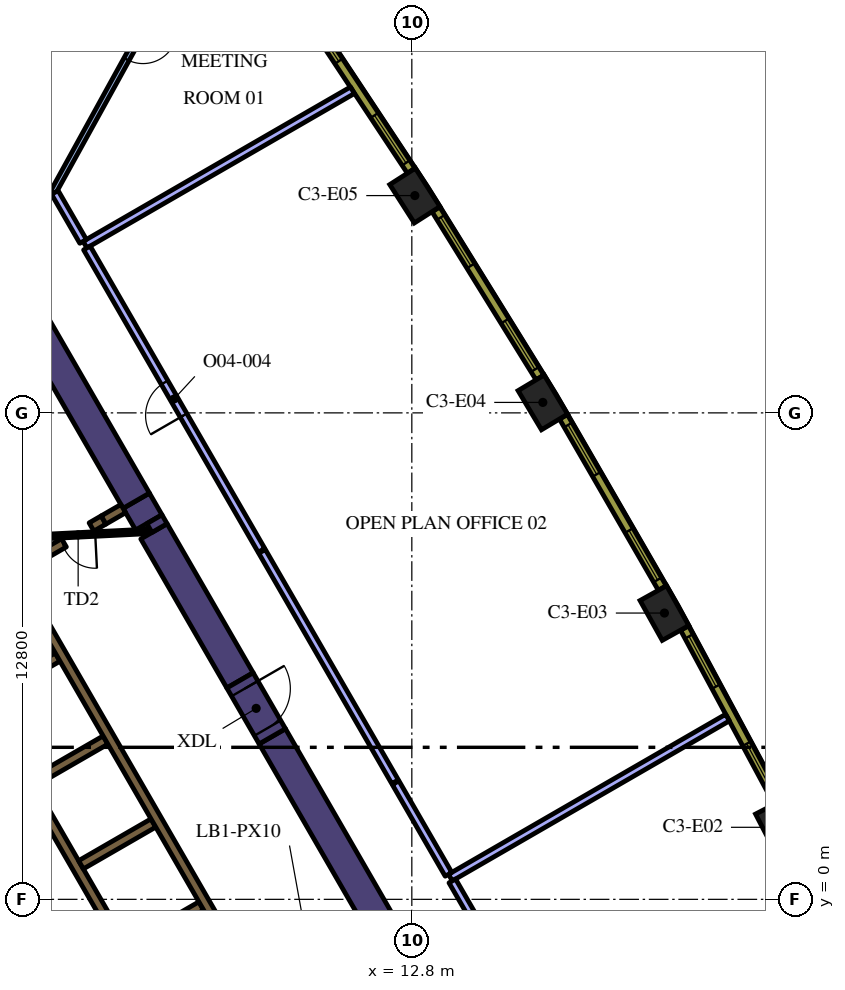
"""IFC4 building model, lengths in metres.
Left out: names, types, materials, properties, quantities, classifications, styles, units other than length and angle.
Written with IfcOpenShell. Run it as: python <this file> out.ifc"""

import sys

from ifc_helpers import new_model, si_unit, direction, frame, frame_2d, origin, origin_2d, place, context, subcontext, project, spatial, polyline, rectangle, outline, extrude, element, fill, save


model = new_model("IFC4")
c1 = context("Model", 3, precision=1e-05, world=origin(), true_north=direction((0.0, 1.0)))
c2 = subcontext(c1, "Body", "Model", "MODEL_VIEW")
j1 = project(units=[si_unit("LENGTHUNIT", "METRE"), si_unit("PLANEANGLEUNIT", "RADIAN")], contexts=[c1])
p1 = place(None, origin())
s1 = spatial("IfcSite", under=j1, at=p1, CompositionType="ELEMENT")
p2 = place(p1, origin())
s2 = spatial("IfcBuilding", under=s1, at=p2, CompositionType="ELEMENT")
p3 = place(p2, frame((0.0, 0.0, 187.8)))
s3 = spatial("IfcBuildingStorey", under=s2, at=p3, CompositionType="ELEMENT", Elevation=187.8)
for number, where, z_axis, x_axis in (
    (1, (22.476, 1.896, 0.0), (0.0, 0.0, 1.0), (-0.46, 0.888, 0.0)),
    (2, (19.447, 7.533, 0.0), (0.0, 0.0, 1.0), (-0.487, 0.874, 0.0)),
    (3, (16.247, 13.075, 0.0), (0.0, 0.0, 1.0), (-0.513, 0.858, 0.0)),
    (4, (12.88, 18.517, 0.0), (0.0, 0.0, 1.0), (-0.539, 0.842, 0.0)),
):
    element("IfcColumn", number, at=place(p3, frame(where, z_axis=z_axis, x_axis=x_axis)), inside=s3, PredefinedType="COLUMN", context=c2, shape_type="SweptSolid", body=[
        extrude(rectangle(XDim=1.2, YDim=0.8, at=origin_2d()), origin(), (0.0, 0.0, 1.0), 4.2),
    ])
p4 = place(p3, frame((9.129, 4.289, 0.0), z_axis=(0.0, 0.0, 1.0), x_axis=(0.499995742806, -0.866027861663, 0.0)))
e5 = element("IfcWall", 5, at=p4, inside=s3, PredefinedType="SOLIDWALL", context=c2, shape_type="SweptSolid", body=[
    extrude(rectangle(XDim=12.527, YDim=0.8, at=frame_2d((6.264, 0.0))), origin(), (0.0, 0.0, 1.0), 4.2),
])
p5 = place(p3, frame((5.878, 9.918, 0.0), z_axis=(0.0, 0.0, 1.0), x_axis=(-0.499893918903, 0.866086641072, 0.0)))
e6 = element("IfcWall", 6, at=p5, inside=s3, PredefinedType="SOLIDWALL", context=c2, shape_type="SweptSolid", body=[
    extrude(rectangle(XDim=0.657, YDim=0.8, at=frame_2d((0.329, 0.0))), origin(), (0.0, 0.0, 1.0), 4.2),
])
p6 = place(p3, frame((8.279, 5.761, 0.0), z_axis=(0.0, 0.0, 1.0), x_axis=(-0.500024261398, 0.866011396007, 0.0)))
e7 = element("IfcWall", 7, at=p6, inside=s3, PredefinedType="SOLIDWALL", context=c2, shape_type="SweptSolid", body=[
    extrude(rectangle(XDim=4.528, YDim=0.8, at=frame_2d((2.264, 0.0))), origin(), (0.0, 0.0, 1.0), 4.2),
])
p7 = place(p3, origin())
e8 = element("IfcWall", 8, at=p7, inside=s3, PredefinedType="SOLIDWALL", context=c2, shape_type="SweptSolid", body=[
    extrude(outline(polyline([(5.961, 9.654), (5.827, 9.886), (6.226, 10.116), (6.36, 9.884), (5.961, 9.654)])), origin(), (0.0, 0.0, 1.0), 4.2),
])
p8 = place(p3, frame((5.549, 10.489, 0.0), z_axis=(0.0, 0.0, 1.0), x_axis=(-0.50001746176, 0.866015321998, 0.0)))
e9 = element("IfcWall", 9, at=p8, inside=s3, PredefinedType="SOLIDWALL", context=c2, shape_type="SweptSolid", body=[
    extrude(rectangle(XDim=7.068, YDim=0.8, at=frame_2d((3.534, 0.0))), origin(), (0.0, 0.0, 1.0), 4.2),
])
p9 = place(p3, frame((6.568, -3.627, 0.0), z_axis=(0.0, 0.0, 1.0), x_axis=(-0.499999455981, 0.866025717874, 0.0)))
e10 = element("IfcWall", 10, at=p9, inside=s3, PredefinedType="SOLIDWALL", context=c2, shape_type="SweptSolid", body=[
    extrude(rectangle(XDim=11.978, YDim=0.25, at=frame_2d((5.989, 0.0))), origin(), (0.0, 0.0, 1.0), 4.2),
])
p10 = place(p3, frame((3.647, 9.38, 0.0), z_axis=(0.0, 0.0, 1.0), x_axis=(-0.866025015791, -0.500000672024, 0.0)))
e11 = element("IfcWall", 11, at=p10, inside=s3, PredefinedType="SOLIDWALL", context=c2, shape_type="SweptSolid", body=[
    extrude(rectangle(XDim=3.849, YDim=0.25, at=frame_2d((1.924, 0.0))), origin(), (0.0, 0.0, 1.0), 4.2),
])
p11 = place(p3, frame((1.574, 5.274, 0.0), z_axis=(0.0, 0.0, 1.0), x_axis=(0.866028486751, 0.499994660107, 0.0)))
e12 = element("IfcWall", 12, at=p11, inside=s3, PredefinedType="SOLIDWALL", context=c2, shape_type="SweptSolid", body=[
    extrude(rectangle(XDim=2.2, YDim=0.25, at=frame_2d((1.1, 0.0))), origin(), (0.0, 0.0, 1.0), 4.2),
])
for number, where, z_axis, x_axis in (
    (13, (2.834, 3.091, 0.0), (0.0, 0.0, 1.0), (0.866, 0.5, 0.0)),
    (14, (4.094, 0.909, 0.0), (0.0, 0.0, 1.0), (0.866, 0.5, 0.0)),
    (15, (5.354, -1.274, 0.0), (0.0, 0.0, 1.0), (0.866, 0.5, 0.0)),
):
    element("IfcWall", number, at=place(p3, frame(where, z_axis=z_axis, x_axis=x_axis)), inside=s3, PredefinedType="SOLIDWALL", context=c2, shape_type="SweptSolid", body=[
        extrude(rectangle(XDim=2.2, YDim=0.25, at=frame_2d((1.1, 0.0))), origin(), (0.0, 0.0, 1.0), 4.2),
    ])
p12 = place(p3, frame((4.688, 9.981, 0.0), z_axis=(0.0, 0.0, 1.0), x_axis=(-0.865974312977, -0.500088481434, 0.0)))
e16 = element("IfcWall", 16, at=p12, inside=s3, PredefinedType="SOLIDWALL", context=c2, shape_type="SweptSolid", body=[
    extrude(rectangle(XDim=0.366, YDim=0.25, at=frame_2d((0.183, 0.0))), origin(), (0.0, 0.0, 1.0), 4.2),
])
p13 = place(p3, frame((4.689, 9.982, 0.0), z_axis=(0.0, 0.0, 1.0), x_axis=(0.865947592822, 0.500134748329, 0.0)))
e17 = element("IfcWall", 17, at=p13, inside=s3, PredefinedType="SOLIDWALL", context=c2, shape_type="SweptSolid", body=[
    extrude(rectangle(XDim=0.598, YDim=0.25, at=frame_2d((0.299, 0.0))), origin(), (0.0, 0.0, 1.0), 4.2),
])
p14 = place(p3, frame((8.565, -2.185, 0.0), z_axis=(0.0, 0.0, 1.0), x_axis=(-0.499997954832, 0.866026584559, 0.0)))
e18 = element("IfcWall", 18, at=p14, inside=s3, PredefinedType="SOLIDWALL", context=c2, shape_type="SweptSolid", body=[
    extrude(rectangle(XDim=12.35, YDim=0.25, at=frame_2d((6.175, 0.0))), origin(), (0.0, 0.0, 1.0), 4.2),
])
p15 = place(p14, frame((0.585, 0.0, 0.0)))
e19 = element("IfcOpeningElement", 19, at=p15, cuts=e18, PredefinedType="OPENING", context=c2, shape_type="SweptSolid", body=[
    extrude(rectangle(XDim=1.1, YDim=2.1, at=frame_2d((0.55, 1.05))), frame((0.0, 0.135, 0.0), z_axis=(0.0, -1.0, 0.0), x_axis=(1.0, 0.0, 0.0)), (0.0, 0.0, 1.0), 0.27),
])
p16 = place(p3, frame((5.917, 9.684, 0.0), z_axis=(0.0, 0.0, 1.0), x_axis=(-0.998758194515, -0.049820366212, 0.0)))
e20 = element("IfcWall", 20, at=p16, inside=s3, PredefinedType="PARTITIONING", context=c2, shape_type="SweptSolid", body=[
    extrude(rectangle(XDim=2.7, YDim=0.12, at=frame_2d((1.35, 0.0))), origin(), (0.0, 0.0, 1.0), 3.15),
])
p17 = place(p16, frame((1.45, 0.0, 0.0)))
e21 = element("IfcOpeningElement", 21, at=p17, cuts=e20, PredefinedType="OPENING", context=c2, shape_type="SweptSolid", body=[
    extrude(rectangle(XDim=0.9, YDim=2.1, at=frame_2d((0.45, 1.05))), frame((0.0, 0.07, 0.0), z_axis=(0.0, -1.0, 0.0), x_axis=(1.0, 0.0, 0.0)), (0.0, 0.0, 1.0), 0.14),
])
p18 = place(p3, frame((8.279, 5.761, 0.0), z_axis=(0.0, 0.0, 1.0), x_axis=(0.500062241894, -0.865989465428, 0.0)))
e22 = element("IfcWall", 22, at=p18, inside=s3, PredefinedType="SOLIDWALL", context=c2, shape_type="SweptSolid", body=[
    extrude(rectangle(XDim=1.7, YDim=0.8, at=frame_2d((0.85, 0.0))), origin(), (0.0, 0.0, 1.0), 4.2),
])
p19 = place(p18, frame((0.25, 0.0, 0.0)))
e23 = element("IfcOpeningElement", 23, at=p19, cuts=e22, PredefinedType="OPENING", context=c2, shape_type="SweptSolid", body=[
    extrude(rectangle(XDim=1.2, YDim=2.1, at=frame_2d((0.6, 1.05))), frame((0.0, 0.41, 0.0), z_axis=(0.0, -1.0, 0.0), x_axis=(1.0, 0.0, 0.0)), (0.0, 0.0, 1.0), 0.82),
])
p20 = place(p3, frame((13.815, 0.572, 0.0), z_axis=(0.0, 0.0, 1.0), x_axis=(0.866036391575, 0.499980968105, 0.0)))
e24 = element("IfcWall", 24, at=p20, inside=s3, PredefinedType="PARTITIONING", context=c2, shape_type="SweptSolid", body=[
    extrude(rectangle(XDim=8.42, YDim=0.2, at=frame_2d((4.21, 0.0))), origin(), (0.0, 0.0, 1.0), 3.15),
])
p21 = place(p3, frame((17.796, -6.324, 0.0), z_axis=(0.0, 0.0, 1.0), x_axis=(-0.500026166427, 0.866010296064, 0.0)))
e25 = element("IfcWall", 25, at=p21, inside=s3, PredefinedType="PARTITIONING", context=c2, shape_type="SweptSolid", body=[
    extrude(rectangle(XDim=7.863, YDim=0.2, at=frame_2d((3.931, 0.0))), origin(), (0.0, 0.0, 1.0), 3.15),
])
p22 = place(p21, frame((3.4, 0.0, 0.0)))
e26 = element("IfcOpeningElement", 26, at=p22, cuts=e25, PredefinedType="OPENING", context=c2, shape_type="SweptSolid", body=[
    extrude(rectangle(XDim=1.0, YDim=2.1, at=frame_2d((0.5, 1.05))), frame((0.0, 0.11, 0.0), z_axis=(0.0, -1.0, 0.0), x_axis=(1.0, 0.0, 0.0)), (0.0, 0.0, 1.0), 0.22),
])
p23 = place(p3, frame((4.2, 17.226, 0.0), z_axis=(0.0, 0.0, 1.0), x_axis=(0.866021486214, 0.500006785369, 0.0)))
e27 = element("IfcWall", 27, at=p23, inside=s3, PredefinedType="PARTITIONING", context=c2, shape_type="SweptSolid", body=[
    extrude(rectangle(XDim=8.126, YDim=0.2, at=frame_2d((4.063, 0.0))), origin(), (0.0, 0.0, 1.0), 3.15),
])
p24 = place(p3, frame((12.359, 3.094, 0.0), z_axis=(0.0, 0.0, 1.0), x_axis=(-0.500010275428, 0.866019471182, 0.0)))
e28 = element("IfcWall", 28, at=p24, inside=s3, PredefinedType="PARTITIONING", context=c2, shape_type="SweptSolid", body=[
    extrude(rectangle(XDim=7.0, YDim=0.2, at=frame_2d((3.5, 0.0))), origin(), (0.0, 0.0, 1.0), 3.15),
])
p25 = place(p3, frame((8.844, 9.182, 0.0), z_axis=(0.0, 0.0, 1.0), x_axis=(-0.50000000053, 0.866025403479, 0.0)))
e29 = element("IfcWall", 29, at=p25, inside=s3, PredefinedType="PARTITIONING", context=c2, shape_type="SweptSolid", body=[
    extrude(rectangle(XDim=9.188, YDim=0.2, at=frame_2d((4.594, 0.0))), origin(), (0.0, 0.0, 1.0), 3.15),
])
p26 = place(p25, frame((4.1, 0.0, 0.0)))
e30 = element("IfcOpeningElement", 30, at=p26, cuts=e29, PredefinedType="OPENING", context=c2, shape_type="SweptSolid", body=[
    extrude(rectangle(XDim=1.0, YDim=2.1, at=frame_2d((0.5, 1.05))), frame((0.0, 0.11, 0.0), z_axis=(0.0, -1.0, 0.0), x_axis=(1.0, 0.0, 0.0)), (0.0, 0.0, 1.0), 0.22),
])
p27 = place(p3, frame((13.765, 0.659, 0.0), z_axis=(0.0, 0.0, 1.0), x_axis=(-0.500046568876, 0.865998515562, 0.0)))
e31 = element("IfcWall", 31, at=p27, inside=s3, PredefinedType="PARTITIONING", context=c2, shape_type="SweptSolid", body=[
    extrude(rectangle(XDim=2.782, YDim=0.2, at=frame_2d((1.391, 0.0))), origin(), (0.0, 0.0, 1.0), 3.15),
])
p28 = place(p3, frame((7.698, 26.465, 0.0), z_axis=(0.0, 0.0, 1.0), x_axis=(-0.482998301798, -0.875621288263, 0.0)))
e32 = element("IfcWall", 32, at=p28, inside=s3, PredefinedType="PARTITIONING", context=c2, shape_type="SweptSolid", body=[
    extrude(rectangle(XDim=8.982, YDim=0.15, at=frame_2d((4.491, 0.0))), origin(), (0.0, 0.0, 1.0), 3.15),
])
p29 = place(p28, frame((4.083, 0.0, 0.0)))
e33 = element("IfcOpeningElement", 33, at=p29, cuts=e32, PredefinedType="OPENING", context=c2, shape_type="SweptSolid", body=[
    extrude(rectangle(XDim=0.9, YDim=2.1, at=frame_2d((0.45, 1.05))), frame((0.0, 0.085, 0.0), z_axis=(0.0, -1.0, 0.0), x_axis=(1.0, 0.0, 0.0)), (0.0, 0.0, 1.0), 0.17),
])
p30 = place(p3, frame((4.15, 17.312, 0.0), z_axis=(0.0, 0.0, 1.0), x_axis=(-0.499935638681, 0.86606255962, 0.0)))
e34 = element("IfcWall", 34, at=p30, inside=s3, PredefinedType="PARTITIONING", context=c2, shape_type="SweptSolid", body=[
    extrude(rectangle(XDim=1.487, YDim=0.2, at=frame_2d((0.744, 0.0))), origin(), (0.0, 0.0, 1.0), 3.15),
])
p31 = place(p3, frame((22.44, 2.555, 0.0), z_axis=(0.0, 0.0, 1.0), x_axis=(-0.473349833294, 0.880874528704, 0.0)))
e35 = element("IfcWall", 35, at=p31, inside=s3, PredefinedType="SOLIDWALL", context=c2, shape_type="SweptSolid", body=[
    extrude(rectangle(XDim=5.204, YDim=0.24, at=frame_2d((2.602, 0.0))), origin(), (0.0, 0.0, 1.0), 3.95),
])
p32 = place(p31, frame((0.248, 0.0, 0.9)))
e36 = element("IfcOpeningElement", 36, at=p32, cuts=e35, PredefinedType="OPENING", context=c2, shape_type="SweptSolid", body=[
    extrude(rectangle(XDim=1.5, YDim=2.55, at=frame_2d((0.75, 1.275))), frame((0.0, 0.13, 0.0), z_axis=(0.0, -1.0, 0.0), x_axis=(1.0, 0.0, 0.0)), (0.0, 0.0, 1.0), 0.26),
])
p33 = place(p31, frame((3.455, 0.0, 0.9)))
e37 = element("IfcOpeningElement", 37, at=p33, cuts=e35, PredefinedType="OPENING", context=c2, shape_type="SweptSolid", body=[
    extrude(rectangle(XDim=1.5, YDim=2.55, at=frame_2d((0.75, 1.275))), frame((0.0, 0.13, 0.0), z_axis=(0.0, -1.0, 0.0), x_axis=(1.0, 0.0, 0.0)), (0.0, 0.0, 1.0), 0.26),
])
p34 = place(p3, frame((19.391, 8.191, 0.0), z_axis=(0.0, 0.0, 1.0), x_axis=(-0.500009456303, 0.866019944116, 0.0)))
e38 = element("IfcWall", 38, at=p34, inside=s3, PredefinedType="SOLIDWALL", context=c2, shape_type="SweptSolid", body=[
    extrude(rectangle(XDim=5.204, YDim=0.24, at=frame_2d((2.602, 0.0))), origin(), (0.0, 0.0, 1.0), 3.95),
])
p35 = place(p34, frame((0.248, 0.0, 0.9)))
e39 = element("IfcOpeningElement", 39, at=p35, cuts=e38, PredefinedType="OPENING", context=c2, shape_type="SweptSolid", body=[
    extrude(rectangle(XDim=1.5, YDim=2.55, at=frame_2d((0.75, 1.275))), frame((0.0, 0.13, 0.0), z_axis=(0.0, -1.0, 0.0), x_axis=(1.0, 0.0, 0.0)), (0.0, 0.0, 1.0), 0.26),
])
p36 = place(p34, frame((3.455, 0.0, 0.9)))
e40 = element("IfcOpeningElement", 40, at=p36, cuts=e38, PredefinedType="OPENING", context=c2, shape_type="SweptSolid", body=[
    extrude(rectangle(XDim=1.5, YDim=2.55, at=frame_2d((0.75, 1.275))), frame((0.0, 0.13, 0.0), z_axis=(0.0, -1.0, 0.0), x_axis=(1.0, 0.0, 0.0)), (0.0, 0.0, 1.0), 0.26),
])
p37 = place(p3, frame((16.171, 13.731, 0.0), z_axis=(0.0, 0.0, 1.0), x_axis=(-0.526197926587, 0.850362124072, 0.0)))
e41 = element("IfcWall", 41, at=p37, inside=s3, PredefinedType="SOLIDWALL", context=c2, shape_type="SweptSolid", body=[
    extrude(rectangle(XDim=5.203, YDim=0.24, at=frame_2d((2.602, 0.0))), origin(), (0.0, 0.0, 1.0), 3.95),
])
p38 = place(p37, frame((0.248, 0.0, 0.9)))
e42 = element("IfcOpeningElement", 42, at=p38, cuts=e41, PredefinedType="OPENING", context=c2, shape_type="SweptSolid", body=[
    extrude(rectangle(XDim=1.5, YDim=2.55, at=frame_2d((0.75, 1.275))), frame((0.0, 0.13, 0.0), z_axis=(0.0, -1.0, 0.0), x_axis=(1.0, 0.0, 0.0)), (0.0, 0.0, 1.0), 0.26),
])
p39 = place(p37, frame((3.455, 0.0, 0.9)))
e43 = element("IfcOpeningElement", 43, at=p39, cuts=e41, PredefinedType="OPENING", context=c2, shape_type="SweptSolid", body=[
    extrude(rectangle(XDim=1.5, YDim=2.55, at=frame_2d((0.75, 1.275))), frame((0.0, 0.13, 0.0), z_axis=(0.0, -1.0, 0.0), x_axis=(1.0, 0.0, 0.0)), (0.0, 0.0, 1.0), 0.26),
])
p40 = place(p3, frame((12.783, 19.171, 0.0), z_axis=(0.0, 0.0, 1.0), x_axis=(-0.551892811511, 0.833915058386, 0.0)))
e44 = element("IfcWall", 44, at=p40, inside=s3, PredefinedType="SOLIDWALL", context=c2, shape_type="SweptSolid", body=[
    extrude(rectangle(XDim=5.204, YDim=0.24, at=frame_2d((2.602, 0.0))), origin(), (0.0, 0.0, 1.0), 3.95),
])
p41 = place(p40, frame((0.248, 0.0, 0.9)))
e45 = element("IfcOpeningElement", 45, at=p41, cuts=e44, PredefinedType="OPENING", context=c2, shape_type="SweptSolid", body=[
    extrude(rectangle(XDim=1.5, YDim=2.55, at=frame_2d((0.75, 1.275))), frame((0.0, 0.13, 0.0), z_axis=(0.0, -1.0, 0.0), x_axis=(1.0, 0.0, 0.0)), (0.0, 0.0, 1.0), 0.26),
])
p42 = place(p40, frame((3.455, 0.0, 0.9)))
e46 = element("IfcOpeningElement", 46, at=p42, cuts=e44, PredefinedType="OPENING", context=c2, shape_type="SweptSolid", body=[
    extrude(rectangle(XDim=1.5, YDim=2.55, at=frame_2d((0.75, 1.275))), frame((0.0, 0.13, 0.0), z_axis=(0.0, -1.0, 0.0), x_axis=(1.0, 0.0, 0.0)), (0.0, 0.0, 1.0), 0.26),
])
p43 = place(p17, origin())
e47 = element("IfcDoor", 47, at=p43, inside=s3, OperationType="SINGLE_SWING_LEFT", PredefinedType="DOOR", context=c2, shape_type="SweptSolid", body=[
    extrude(rectangle(XDim=0.9, YDim=2.1, at=frame_2d((0.45, 1.05))), frame((0.0, 0.025, 0.0), z_axis=(0.0, -1.0, 0.0), x_axis=(1.0, 0.0, 0.0)), (0.0, 0.0, 1.0), 0.05),
])
fill(e21, e47)
p44 = place(p19, origin())
e48 = element("IfcDoor", 48, at=p44, inside=s3, OperationType="SINGLE_SWING_LEFT", PredefinedType="DOOR", context=c2, shape_type="SweptSolid", body=[
    extrude(rectangle(XDim=1.2, YDim=2.1, at=frame_2d((0.6, 1.05))), frame((0.0, 0.025, 0.0), z_axis=(0.0, -1.0, 0.0), x_axis=(1.0, 0.0, 0.0)), (0.0, 0.0, 1.0), 0.05),
])
fill(e23, e48)
p45 = place(p26, origin())
e49 = element("IfcDoor", 49, at=p45, inside=s3, OperationType="SINGLE_SWING_RIGHT", PredefinedType="DOOR", context=c2, shape_type="SweptSolid", body=[
    extrude(rectangle(XDim=1.0, YDim=2.1, at=frame_2d((0.5, 1.05))), frame((0.0, 0.025, 0.0), z_axis=(0.0, -1.0, 0.0), x_axis=(1.0, 0.0, 0.0)), (0.0, 0.0, 1.0), 0.05),
])
fill(e30, e49)
p46 = place(p29, origin())
e50 = element("IfcDoor", 50, at=p46, inside=s3, OperationType="SINGLE_SWING_RIGHT", PredefinedType="DOOR", context=c2, shape_type="SweptSolid", body=[
    extrude(rectangle(XDim=0.9, YDim=2.1, at=frame_2d((0.45, 1.05))), frame((0.0, 0.025, 0.0), z_axis=(0.0, -1.0, 0.0), x_axis=(1.0, 0.0, 0.0)), (0.0, 0.0, 1.0), 0.05),
])
fill(e33, e50)
p47 = place(p32, origin())
e51 = element("IfcWindow", 51, at=p47, inside=s3, PartitioningType="SINGLE_PANEL", PredefinedType="WINDOW", context=c2, shape_type="SweptSolid", body=[
    extrude(rectangle(XDim=1.5, YDim=2.55, at=frame_2d((0.75, 1.275))), frame((0.0, 0.04, 0.0), z_axis=(0.0, -1.0, 0.0), x_axis=(1.0, 0.0, 0.0)), (0.0, 0.0, 1.0), 0.06),
])
fill(e36, e51)
p48 = place(p33, origin())
e52 = element("IfcWindow", 52, at=p48, inside=s3, PartitioningType="SINGLE_PANEL", PredefinedType="WINDOW", context=c2, shape_type="SweptSolid", body=[
    extrude(rectangle(XDim=1.5, YDim=2.55, at=frame_2d((0.75, 1.275))), frame((0.0, 0.04, 0.0), z_axis=(0.0, -1.0, 0.0), x_axis=(1.0, 0.0, 0.0)), (0.0, 0.0, 1.0), 0.06),
])
fill(e37, e52)
p49 = place(p35, origin())
e53 = element("IfcWindow", 53, at=p49, inside=s3, PartitioningType="SINGLE_PANEL", PredefinedType="WINDOW", context=c2, shape_type="SweptSolid", body=[
    extrude(rectangle(XDim=1.5, YDim=2.55, at=frame_2d((0.75, 1.275))), frame((0.0, 0.04, 0.0), z_axis=(0.0, -1.0, 0.0), x_axis=(1.0, 0.0, 0.0)), (0.0, 0.0, 1.0), 0.06),
])
fill(e39, e53)
p50 = place(p36, origin())
e54 = element("IfcWindow", 54, at=p50, inside=s3, PartitioningType="SINGLE_PANEL", PredefinedType="WINDOW", context=c2, shape_type="SweptSolid", body=[
    extrude(rectangle(XDim=1.5, YDim=2.55, at=frame_2d((0.75, 1.275))), frame((0.0, 0.04, 0.0), z_axis=(0.0, -1.0, 0.0), x_axis=(1.0, 0.0, 0.0)), (0.0, 0.0, 1.0), 0.06),
])
fill(e40, e54)
p51 = place(p38, origin())
e55 = element("IfcWindow", 55, at=p51, inside=s3, PartitioningType="SINGLE_PANEL", PredefinedType="WINDOW", context=c2, shape_type="SweptSolid", body=[
    extrude(rectangle(XDim=1.5, YDim=2.55, at=frame_2d((0.75, 1.275))), frame((0.0, 0.04, 0.0), z_axis=(0.0, -1.0, 0.0), x_axis=(1.0, 0.0, 0.0)), (0.0, 0.0, 1.0), 0.06),
])
fill(e42, e55)
p52 = place(p39, origin())
e56 = element("IfcWindow", 56, at=p52, inside=s3, PartitioningType="SINGLE_PANEL", PredefinedType="WINDOW", context=c2, shape_type="SweptSolid", body=[
    extrude(rectangle(XDim=1.5, YDim=2.55, at=frame_2d((0.75, 1.275))), frame((0.0, 0.04, 0.0), z_axis=(0.0, -1.0, 0.0), x_axis=(1.0, 0.0, 0.0)), (0.0, 0.0, 1.0), 0.06),
])
fill(e43, e56)
p53 = place(p41, origin())
e57 = element("IfcWindow", 57, at=p53, inside=s3, PartitioningType="SINGLE_PANEL", PredefinedType="WINDOW", context=c2, shape_type="SweptSolid", body=[
    extrude(rectangle(XDim=1.5, YDim=2.55, at=frame_2d((0.75, 1.275))), frame((0.0, 0.04, 0.0), z_axis=(0.0, -1.0, 0.0), x_axis=(1.0, 0.0, 0.0)), (0.0, 0.0, 1.0), 0.06),
])
fill(e45, e57)
p54 = place(p42, origin())
e58 = element("IfcWindow", 58, at=p54, inside=s3, PartitioningType="SINGLE_PANEL", PredefinedType="WINDOW", context=c2, shape_type="SweptSolid", body=[
    extrude(rectangle(XDim=1.5, YDim=2.55, at=frame_2d((0.75, 1.275))), frame((0.0, 0.04, 0.0), z_axis=(0.0, -1.0, 0.0), x_axis=(1.0, 0.0, 0.0)), (0.0, 0.0, 1.0), 0.06),
])
fill(e46, e58)
save(model, sys.argv[1])
